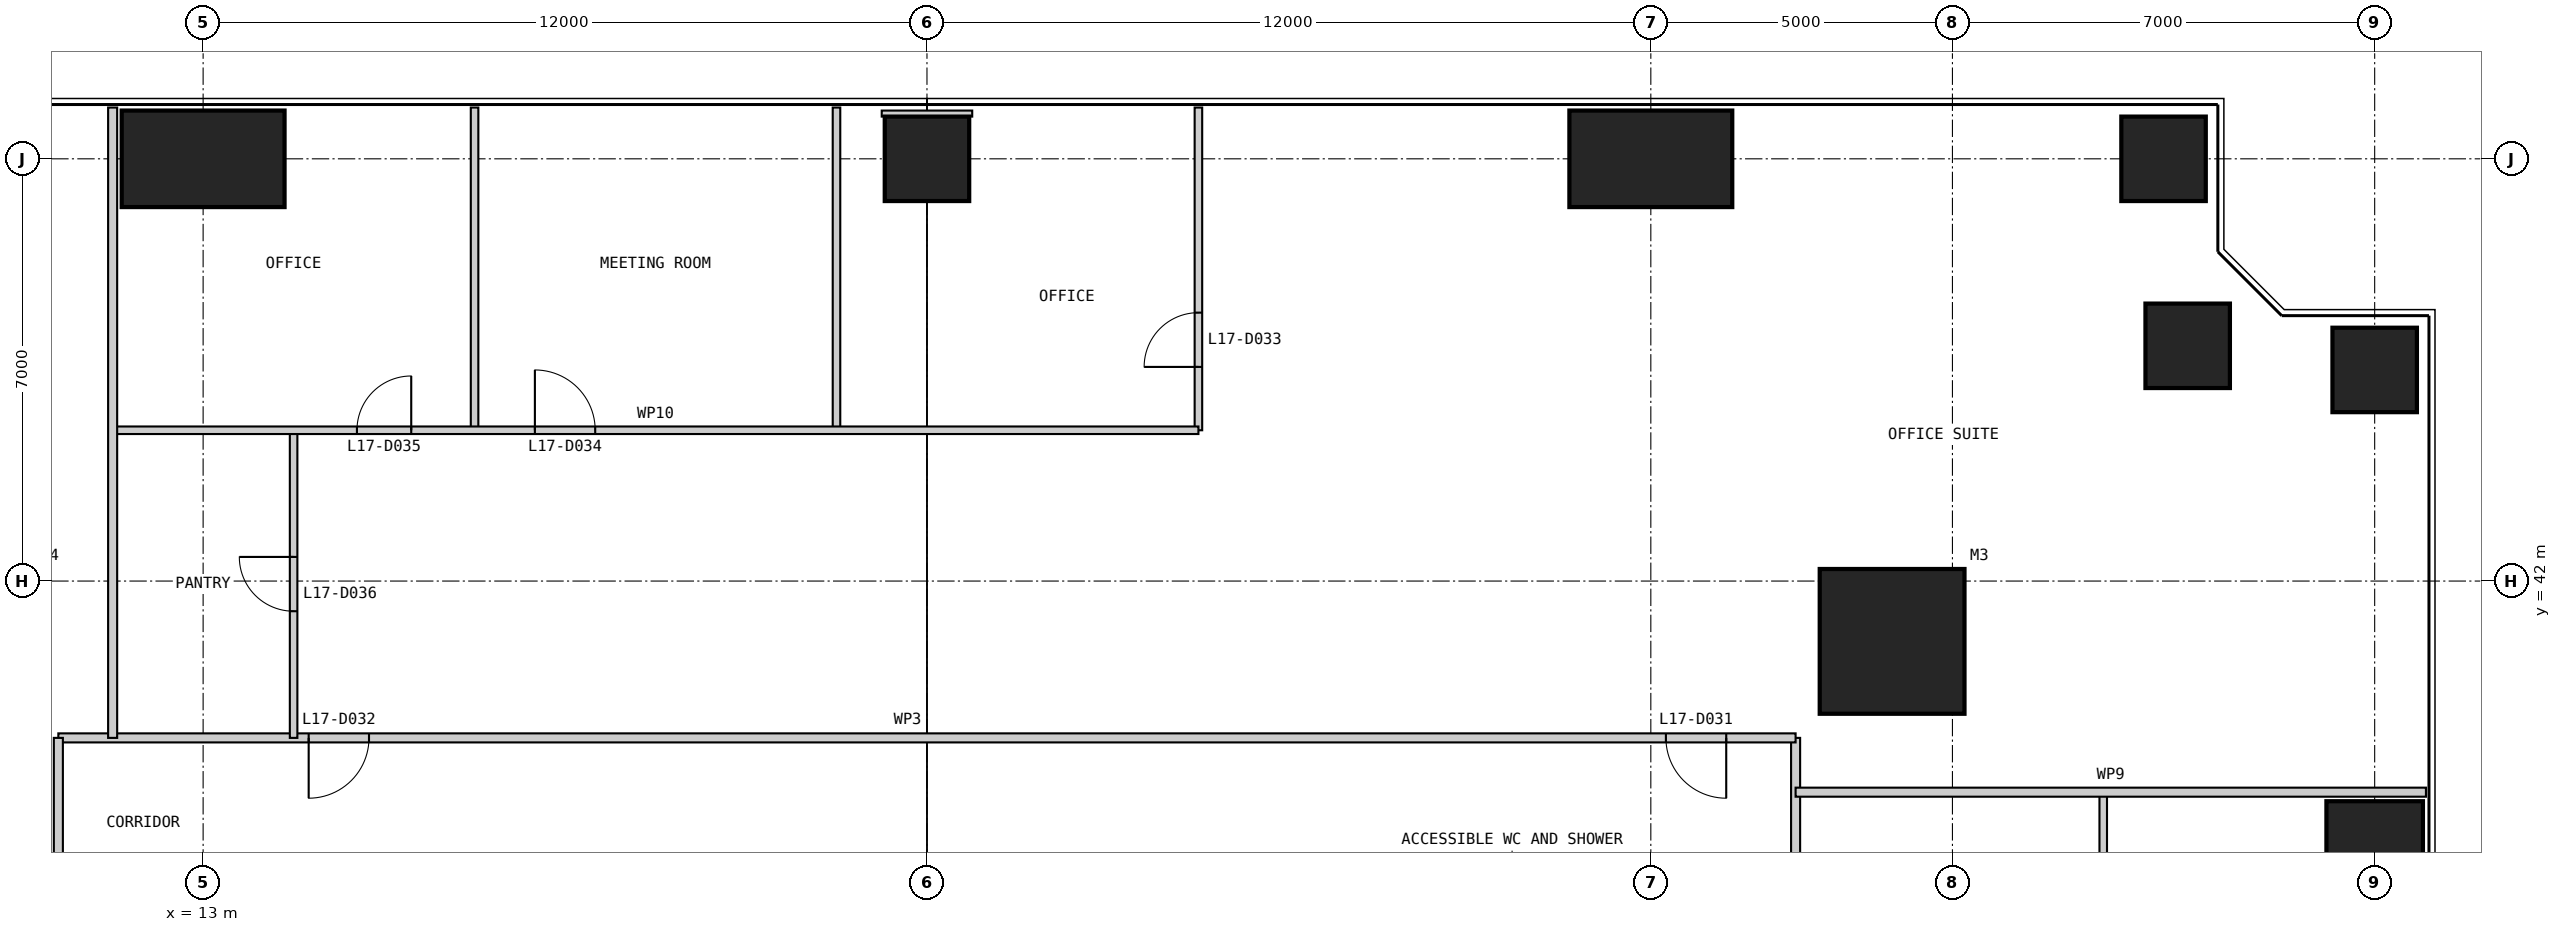
"""IFC4 building model, lengths in metres.
Left out: names, types, materials, properties, quantities, classifications, styles, units other than length and angle.
Written with IfcOpenShell. Run it as: python <this file> out.ifc"""

import sys

from ifc_helpers import new_model, si_unit, direction, frame, frame_2d, origin, origin_2d, place, context, subcontext, project, spatial, rectangle, extrude, element, fill, save


model = new_model("IFC4")
c1 = context("Model", 3, precision=1e-05, world=origin(), true_north=direction((0.0, 1.0)))
c2 = subcontext(c1, "Body", "Model", "MODEL_VIEW")
j1 = project(units=[si_unit("LENGTHUNIT", "METRE"), si_unit("PLANEANGLEUNIT", "RADIAN")], contexts=[c1])
p1 = place(None, origin())
s1 = spatial("IfcSite", under=j1, at=p1, CompositionType="ELEMENT")
p2 = place(p1, origin())
s2 = spatial("IfcBuilding", under=s1, at=p2, CompositionType="ELEMENT")
p3 = place(p2, frame((0.0, 0.0, 75.0)))
s3 = spatial("IfcBuildingStorey", under=s2, at=p3, CompositionType="ELEMENT", Elevation=75.0)
p4 = place(p3, frame((41.0, 41.0, 0.0), z_axis=(0.0, 0.0, 1.0), x_axis=(1.0, 0.0, 0.0)))
e1 = element("IfcColumn", 1, at=p4, inside=s3, PredefinedType="COLUMN", context=c2, shape_type="SweptSolid", body=[
    extrude(rectangle(XDim=2.4, YDim=2.4, at=origin_2d()), origin(), (0.0, 0.0, 1.0), 4.0),
])
p5 = place(p3, frame((49.0, 37.0, 0.0), z_axis=(0.0, 0.0, 1.0), x_axis=(1.0, 0.0, 0.0)))
e2 = element("IfcColumn", 2, at=p5, inside=s3, PredefinedType="COLUMN", context=c2, shape_type="SweptSolid", body=[
    extrude(rectangle(XDim=1.6, YDim=2.7, at=origin_2d()), origin(), (0.0, 0.0, 1.0), 4.0),
])
for number, where, z_axis, x_axis in (
    (3, (49.0, 45.5, 0.0), (0.0, 0.0, 1.0), (1.0, 0.0, 0.0)),
    (4, (45.9, 45.9, 0.0), (0.0, 0.0, 1.0), (1.0, 0.0, 0.0)),
    (5, (45.5, 49.0, 0.0), (0.0, 0.0, 1.0), (1.0, 0.0, 0.0)),
):
    element("IfcColumn", number, at=place(p3, frame(where, z_axis=z_axis, x_axis=x_axis)), inside=s3, PredefinedType="COLUMN", context=c2, shape_type="SweptSolid", body=[
        extrude(rectangle(XDim=1.4, YDim=1.4, at=origin_2d()), origin(), (0.0, 0.0, 1.0), 4.0),
    ])
p6 = place(p3, frame((37.0, 49.0, 0.0), z_axis=(0.0, 0.0, 1.0), x_axis=(1.0, 0.0, 0.0)))
e6 = element("IfcColumn", 6, at=p6, inside=s3, PredefinedType="COLUMN", context=c2, shape_type="SweptSolid", body=[
    extrude(rectangle(XDim=2.7, YDim=1.6, at=origin_2d()), origin(), (0.0, 0.0, 1.0), 4.0),
])
p7 = place(p3, frame((25.0, 49.0, 0.0), z_axis=(0.0, 0.0, 1.0), x_axis=(1.0, 0.0, 0.0)))
e7 = element("IfcColumn", 7, at=p7, inside=s3, PredefinedType="COLUMN", context=c2, shape_type="SweptSolid", body=[
    extrude(rectangle(XDim=1.4, YDim=1.4, at=origin_2d()), origin(), (0.0, 0.0, 1.0), 4.0),
])
p8 = place(p3, frame((13.0, 49.0, 0.0), z_axis=(0.0, 0.0, 1.0), x_axis=(1.0, 0.0, 0.0)))
e8 = element("IfcColumn", 8, at=p8, inside=s3, PredefinedType="COLUMN", context=c2, shape_type="SweptSolid", body=[
    extrude(rectangle(XDim=2.7, YDim=1.6, at=origin_2d()), origin(), (0.0, 0.0, 1.0), 4.0),
])
p9 = place(p3, frame((39.4, 11.5, 0.0), z_axis=(0.0, 0.0, 1.0), x_axis=(0.0, 1.0, 0.0)))
e9 = element("IfcWall", 9, at=p9, inside=s3, PredefinedType="PARTITIONING", context=c2, shape_type="SweptSolid", body=[
    extrude(rectangle(XDim=27.9, YDim=0.15, at=frame_2d((13.95, 0.0))), origin(), (0.0, 0.0, 1.0), 3.85),
])
p10 = place(p9, frame((0.25, 0.0, 0.0)))
e10 = element("IfcOpeningElement", 10, at=p10, cuts=e9, PredefinedType="OPENING", context=c2, shape_type="SweptSolid", body=[
    extrude(rectangle(XDim=1.0, YDim=2.2, at=frame_2d((0.5, 1.1))), frame((0.0, 0.085, 0.0), z_axis=(0.0, -1.0, 0.0), x_axis=(1.0, 0.0, 0.0)), (0.0, 0.0, 1.0), 0.17),
])
p11 = place(p9, frame((22.75, 0.0, 0.0)))
e11 = element("IfcOpeningElement", 11, at=p11, cuts=e9, PredefinedType="OPENING", context=c2, shape_type="SweptSolid", body=[
    extrude(rectangle(XDim=1.0, YDim=2.2, at=frame_2d((0.5, 1.1))), frame((0.0, 0.085, 0.0), z_axis=(0.0, -1.0, 0.0), x_axis=(1.0, 0.0, 0.0)), (0.0, 0.0, 1.0), 0.17),
])
p12 = place(p3, frame((44.5, 20.5, 0.0), z_axis=(0.0, 0.0, 1.0), x_axis=(0.0, 1.0, 0.0)))
e12 = element("IfcWall", 12, at=p12, inside=s3, PredefinedType="PARTITIONING", context=c2, shape_type="SweptSolid", body=[
    extrude(rectangle(XDim=18.0, YDim=0.125, at=frame_2d((9.0, 0.0))), origin(), (0.0, 0.0, 1.0), 3.85),
])
p13 = place(p12, frame((10.0, 0.0, 0.0)))
e13 = element("IfcOpeningElement", 13, at=p13, cuts=e12, PredefinedType="OPENING", context=c2, shape_type="SweptSolid", body=[
    extrude(rectangle(XDim=1.0, YDim=2.2, at=frame_2d((0.5, 1.1))), frame((0.0, 0.073, 0.0), z_axis=(0.0, -1.0, 0.0), x_axis=(1.0, 0.0, 0.0)), (0.0, 0.0, 1.0), 0.145),
])
p14 = place(p12, frame((13.05, 0.0, 0.0)))
e14 = element("IfcOpeningElement", 14, at=p14, cuts=e12, PredefinedType="OPENING", context=c2, shape_type="SweptSolid", body=[
    extrude(rectangle(XDim=0.9, YDim=2.2, at=frame_2d((0.45, 1.1))), frame((0.0, 0.073, 0.0), z_axis=(0.0, -1.0, 0.0), x_axis=(1.0, 0.0, 0.0)), (0.0, 0.0, 1.0), 0.145),
])
p15 = place(p3, frame((39.4, 39.4, 0.0), z_axis=(0.0, 0.0, 1.0), x_axis=(-1.0, 0.0, 0.0)))
e15 = element("IfcWall", 15, at=p15, inside=s3, PredefinedType="PARTITIONING", context=c2, shape_type="SweptSolid", body=[
    extrude(rectangle(XDim=28.8, YDim=0.15, at=frame_2d((14.4, 0.0))), origin(), (0.0, 0.0, 1.0), 3.85),
])
p16 = place(p15, frame((1.15, 0.0, 0.0)))
e16 = element("IfcOpeningElement", 16, at=p16, cuts=e15, PredefinedType="OPENING", context=c2, shape_type="SweptSolid", body=[
    extrude(rectangle(XDim=1.0, YDim=2.2, at=frame_2d((0.5, 1.1))), frame((0.0, 0.085, 0.0), z_axis=(0.0, -1.0, 0.0), x_axis=(1.0, 0.0, 0.0)), (0.0, 0.0, 1.0), 0.17),
])
p17 = place(p15, frame((23.65, 0.0, 0.0)))
e17 = element("IfcOpeningElement", 17, at=p17, cuts=e15, PredefinedType="OPENING", context=c2, shape_type="SweptSolid", body=[
    extrude(rectangle(XDim=1.0, YDim=2.2, at=frame_2d((0.5, 1.1))), frame((0.0, 0.085, 0.0), z_axis=(0.0, -1.0, 0.0), x_axis=(1.0, 0.0, 0.0)), (0.0, 0.0, 1.0), 0.17),
])
p18 = place(p3, frame((49.85, 38.5, 0.0), z_axis=(0.0, 0.0, 1.0), x_axis=(-1.0, 0.0, 0.0)))
e18 = element("IfcWall", 18, at=p18, inside=s3, PredefinedType="PARTITIONING", context=c2, shape_type="SweptSolid", body=[
    extrude(rectangle(XDim=10.45, YDim=0.15, at=frame_2d((5.225, 0.0))), origin(), (0.0, 0.0, 1.0), 3.85),
])
p19 = place(p3, frame((29.5, 49.85, 0.0), z_axis=(0.0, 0.0, 1.0), x_axis=(0.0, -1.0, 0.0)))
e19 = element("IfcWall", 19, at=p19, inside=s3, PredefinedType="PARTITIONING", context=c2, shape_type="SweptSolid", body=[
    extrude(rectangle(XDim=5.35, YDim=0.125, at=frame_2d((2.675, 0.0))), origin(), (0.0, 0.0, 1.0), 3.85),
])
p20 = place(p19, frame((3.4, 0.0, 0.0)))
e20 = element("IfcOpeningElement", 20, at=p20, cuts=e19, PredefinedType="OPENING", context=c2, shape_type="SweptSolid", body=[
    extrude(rectangle(XDim=0.9, YDim=2.2, at=frame_2d((0.45, 1.1))), frame((0.0, 0.073, 0.0), z_axis=(0.0, -1.0, 0.0), x_axis=(1.0, 0.0, 0.0)), (0.0, 0.0, 1.0), 0.145),
])
for number, where, z_axis, x_axis in (
    (21, (23.5, 49.85, 0.0), (0.0, 0.0, 1.0), (0.0, -1.0, 0.0)),
    (22, (17.5, 49.85, 0.0), (0.0, 0.0, 1.0), (0.0, -1.0, 0.0)),
):
    element("IfcWall", number, at=place(p3, frame(where, z_axis=z_axis, x_axis=x_axis)), inside=s3, PredefinedType="PARTITIONING", context=c2, shape_type="SweptSolid", body=[
        extrude(rectangle(XDim=5.35, YDim=0.125, at=frame_2d((2.675, 0.0))), origin(), (0.0, 0.0, 1.0), 3.85),
    ])
p21 = place(p3, frame((14.5, 44.5, 0.0), z_axis=(0.0, 0.0, 1.0), x_axis=(0.0, -1.0, 0.0)))
e23 = element("IfcWall", 23, at=p21, inside=s3, PredefinedType="PARTITIONING", context=c2, shape_type="SweptSolid", body=[
    extrude(rectangle(XDim=5.1, YDim=0.125, at=frame_2d((2.55, 0.0))), origin(), (0.0, 0.0, 1.0), 3.85),
])
p22 = place(p21, frame((2.1, 0.0, 0.0)))
e24 = element("IfcOpeningElement", 24, at=p22, cuts=e23, PredefinedType="OPENING", context=c2, shape_type="SweptSolid", body=[
    extrude(rectangle(XDim=0.9, YDim=2.2, at=frame_2d((0.45, 1.1))), frame((0.0, 0.073, 0.0), z_axis=(0.0, -1.0, 0.0), x_axis=(1.0, 0.0, 0.0)), (0.0, 0.0, 1.0), 0.145),
])
p23 = place(p3, frame((29.5, 44.5, 0.0), z_axis=(0.0, 0.0, 1.0), x_axis=(-1.0, 0.0, 0.0)))
e25 = element("IfcWall", 25, at=p23, inside=s3, PredefinedType="PARTITIONING", context=c2, shape_type="SweptSolid", body=[
    extrude(rectangle(XDim=18.0, YDim=0.125, at=frame_2d((9.0, 0.0))), origin(), (0.0, 0.0, 1.0), 3.85),
])
p24 = place(p23, frame((10.0, 0.0, 0.0)))
e26 = element("IfcOpeningElement", 26, at=p24, cuts=e25, PredefinedType="OPENING", context=c2, shape_type="SweptSolid", body=[
    extrude(rectangle(XDim=1.0, YDim=2.2, at=frame_2d((0.5, 1.1))), frame((0.0, 0.073, 0.0), z_axis=(0.0, -1.0, 0.0), x_axis=(1.0, 0.0, 0.0)), (0.0, 0.0, 1.0), 0.145),
])
p25 = place(p23, frame((13.05, 0.0, 0.0)))
e27 = element("IfcOpeningElement", 27, at=p25, cuts=e25, PredefinedType="OPENING", context=c2, shape_type="SweptSolid", body=[
    extrude(rectangle(XDim=0.9, YDim=2.2, at=frame_2d((0.45, 1.1))), frame((0.0, 0.073, 0.0), z_axis=(0.0, -1.0, 0.0), x_axis=(1.0, 0.0, 0.0)), (0.0, 0.0, 1.0), 0.145),
])
p26 = place(p3, frame((10.6, 39.4, 0.0), z_axis=(0.0, 0.0, 1.0), x_axis=(0.0, -1.0, 0.0)))
e28 = element("IfcWall", 28, at=p26, inside=s3, PredefinedType="PARTITIONING", context=c2, shape_type="SweptSolid", body=[
    extrude(rectangle(XDim=27.9, YDim=0.15, at=frame_2d((13.95, 0.0))), origin(), (0.0, 0.0, 1.0), 3.85),
])
p27 = place(p26, frame((3.4, 0.0, 0.0)))
e29 = element("IfcOpeningElement", 29, at=p27, cuts=e28, PredefinedType="OPENING", context=c2, shape_type="SweptSolid", body=[
    extrude(rectangle(XDim=1.0, YDim=2.2, at=frame_2d((0.5, 1.1))), frame((0.0, 0.085, 0.0), z_axis=(0.0, -1.0, 0.0), x_axis=(1.0, 0.0, 0.0)), (0.0, 0.0, 1.0), 0.17),
])
p28 = place(p26, frame((10.15, 0.0, 0.0)))
e30 = element("IfcOpeningElement", 30, at=p28, cuts=e28, PredefinedType="OPENING", context=c2, shape_type="SweptSolid", body=[
    extrude(rectangle(XDim=1.0, YDim=2.2, at=frame_2d((0.5, 1.1))), frame((0.0, 0.085, 0.0), z_axis=(0.0, -1.0, 0.0), x_axis=(1.0, 0.0, 0.0)), (0.0, 0.0, 1.0), 0.17),
])
p29 = place(p26, frame((17.65, 0.0, 0.0)))
e31 = element("IfcOpeningElement", 31, at=p29, cuts=e28, PredefinedType="OPENING", context=c2, shape_type="SweptSolid", body=[
    extrude(rectangle(XDim=1.0, YDim=2.2, at=frame_2d((0.5, 1.1))), frame((0.0, 0.085, 0.0), z_axis=(0.0, -1.0, 0.0), x_axis=(1.0, 0.0, 0.0)), (0.0, 0.0, 1.0), 0.17),
])
p30 = place(p26, frame((24.4, 0.0, 0.0)))
e32 = element("IfcOpeningElement", 32, at=p30, cuts=e28, PredefinedType="OPENING", context=c2, shape_type="SweptSolid", body=[
    extrude(rectangle(XDim=1.0, YDim=2.2, at=frame_2d((0.5, 1.1))), frame((0.0, 0.085, 0.0), z_axis=(0.0, -1.0, 0.0), x_axis=(1.0, 0.0, 0.0)), (0.0, 0.0, 1.0), 0.17),
])
p31 = place(p3, frame((11.5, 49.85, 0.0), z_axis=(0.0, 0.0, 1.0), x_axis=(0.0, -1.0, 0.0)))
e33 = element("IfcWall", 33, at=p31, inside=s3, PredefinedType="PARTITIONING", context=c2, shape_type="SweptSolid", body=[
    extrude(rectangle(XDim=10.45, YDim=0.15, at=frame_2d((5.225, 0.0))), origin(), (0.0, 0.0, 1.0), 3.85),
])
p32 = place(p3, frame((25.0, 49.8, 0.0), z_axis=(0.0, 0.0, 1.0), x_axis=(0.0, -1.0, 0.0)))
e34 = element("IfcWall", 34, at=p32, inside=s3, PredefinedType="PARTITIONING", context=c2, shape_type="SweptSolid", body=[
    extrude(rectangle(XDim=0.1, YDim=1.5, at=frame_2d((0.05, 0.0))), origin(), (0.0, 0.0, 1.0), 3.85),
])
p33 = place(p16, origin())
e35 = element("IfcDoor", 35, at=p33, inside=s3, OperationType="SINGLE_SWING_LEFT", PredefinedType="DOOR", context=c2, shape_type="SweptSolid", body=[
    extrude(rectangle(XDim=1.0, YDim=2.2, at=frame_2d((0.5, 1.1))), frame((0.0, 0.025, 0.0), z_axis=(0.0, -1.0, 0.0), x_axis=(1.0, 0.0, 0.0)), (0.0, 0.0, 1.0), 0.05),
])
fill(e16, e35)
p34 = place(p17, origin())
e36 = element("IfcDoor", 36, at=p34, inside=s3, OperationType="SINGLE_SWING_RIGHT", PredefinedType="DOOR", context=c2, shape_type="SweptSolid", body=[
    extrude(rectangle(XDim=1.0, YDim=2.2, at=frame_2d((0.5, 1.1))), frame((0.0, 0.025, 0.0), z_axis=(0.0, -1.0, 0.0), x_axis=(1.0, 0.0, 0.0)), (0.0, 0.0, 1.0), 0.05),
])
fill(e17, e36)
p35 = place(p20, frame((0.9, 0.0, 0.0), z_axis=(0.0, 0.0, 1.0), x_axis=(-1.0, 0.0, 0.0)))
e37 = element("IfcDoor", 37, at=p35, inside=s3, OperationType="SINGLE_SWING_LEFT", PredefinedType="DOOR", context=c2, shape_type="SweptSolid", body=[
    extrude(rectangle(XDim=0.9, YDim=2.2, at=frame_2d((0.45, 1.1))), frame((0.0, 0.025, 0.0), z_axis=(0.0, -1.0, 0.0), x_axis=(1.0, 0.0, 0.0)), (0.0, 0.0, 1.0), 0.05),
])
fill(e20, e37)
p36 = place(p24, frame((1.0, 0.0, 0.0), z_axis=(0.0, 0.0, 1.0), x_axis=(-1.0, 0.0, 0.0)))
e38 = element("IfcDoor", 38, at=p36, inside=s3, OperationType="SINGLE_SWING_LEFT", PredefinedType="DOOR", context=c2, shape_type="SweptSolid", body=[
    extrude(rectangle(XDim=1.0, YDim=2.2, at=frame_2d((0.5, 1.1))), frame((0.0, 0.025, 0.0), z_axis=(0.0, -1.0, 0.0), x_axis=(1.0, 0.0, 0.0)), (0.0, 0.0, 1.0), 0.05),
])
fill(e26, e38)
p37 = place(p25, frame((0.9, 0.0, 0.0), z_axis=(0.0, 0.0, 1.0), x_axis=(-1.0, 0.0, 0.0)))
e39 = element("IfcDoor", 39, at=p37, inside=s3, OperationType="SINGLE_SWING_RIGHT", PredefinedType="DOOR", context=c2, shape_type="SweptSolid", body=[
    extrude(rectangle(XDim=0.9, YDim=2.2, at=frame_2d((0.45, 1.1))), frame((0.0, 0.025, 0.0), z_axis=(0.0, -1.0, 0.0), x_axis=(1.0, 0.0, 0.0)), (0.0, 0.0, 1.0), 0.05),
])
fill(e27, e39)
p38 = place(p22, frame((0.9, 0.0, 0.0), z_axis=(0.0, 0.0, 1.0), x_axis=(-1.0, 0.0, 0.0)))
e40 = element("IfcDoor", 40, at=p38, inside=s3, OperationType="SINGLE_SWING_RIGHT", PredefinedType="DOOR", context=c2, shape_type="SweptSolid", body=[
    extrude(rectangle(XDim=0.9, YDim=2.2, at=frame_2d((0.45, 1.1))), frame((0.0, 0.025, 0.0), z_axis=(0.0, -1.0, 0.0), x_axis=(1.0, 0.0, 0.0)), (0.0, 0.0, 1.0), 0.05),
])
fill(e24, e40)
save(model, sys.argv[1])
